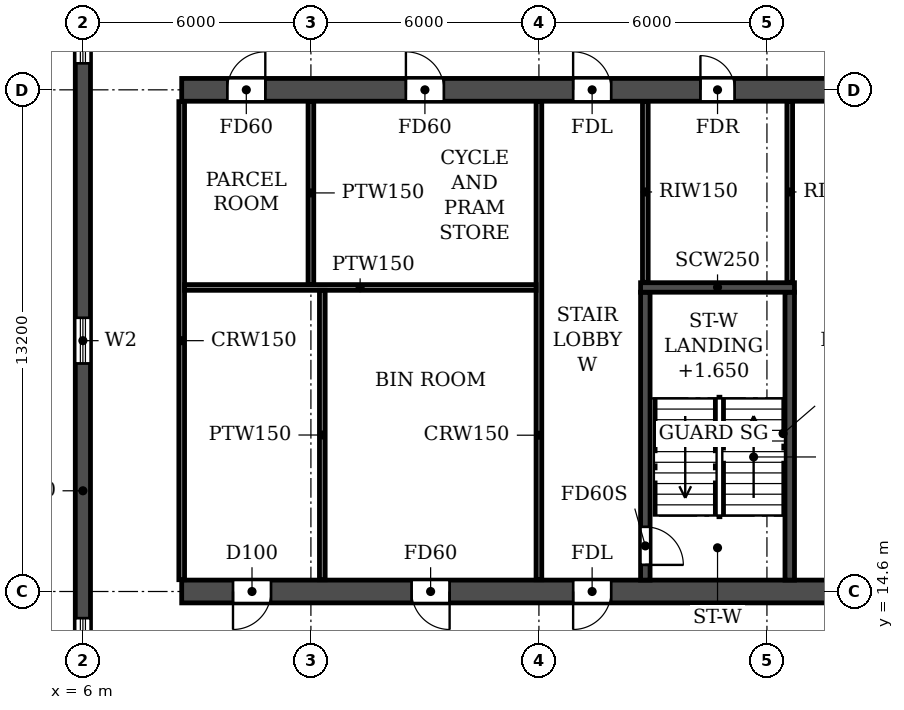
"""IFC4 building model, lengths in metres.
Left out: names, types, materials, properties, quantities, classifications, styles, units other than length and angle.
Written with IfcOpenShell. Run it as: python <this file> out.ifc"""

import sys

from ifc_helpers import new_model, si_unit, direction, frame, frame_2d, origin, place, context, subcontext, project, spatial, rectangle, extrude, element, fill, save


model = new_model("IFC4")
c1 = context("Model", 3, precision=1e-05, world=origin(), true_north=direction((0.0, 1.0)))
c2 = subcontext(c1, "Body", "Model", "MODEL_VIEW")
j1 = project(units=[si_unit("LENGTHUNIT", "METRE"), si_unit("PLANEANGLEUNIT", "RADIAN")], contexts=[c1])
p1 = place(None, origin())
s1 = spatial("IfcSite", under=j1, at=p1, CompositionType="ELEMENT")
p2 = place(p1, origin())
s2 = spatial("IfcBuilding", under=s1, at=p2, CompositionType="ELEMENT")
p3 = place(p2, frame((0.0, 0.0, 56.4)))
s3 = spatial("IfcBuildingStorey", under=s2, at=p3, CompositionType="ELEMENT", Elevation=56.4)
p4 = place(p3, frame((6.0, 4.683, 0.0), z_axis=(0.0, 0.0, 1.0), x_axis=(0.0, 1.0, 0.0)))
e1 = element("IfcWall", 1, at=p4, inside=s3, PredefinedType="SHEAR", context=c2, shape_type="SweptSolid", body=[
    extrude(rectangle(XDim=35.434, YDim=0.4, at=frame_2d((17.717, 0.0))), origin(), (0.0, 0.0, 1.0), 3.05),
])
p5 = place(p4, frame((23.817, 0.0, 0.9)))
e2 = element("IfcOpeningElement", 2, at=p5, cuts=e1, PredefinedType="OPENING", context=c2, shape_type="SweptSolid", body=[
    extrude(rectangle(XDim=1.2, YDim=1.5, at=frame_2d((0.6, 0.75))), frame((0.0, 0.21, 0.0), z_axis=(0.0, -1.0, 0.0), x_axis=(1.0, 0.0, 0.0)), (0.0, 0.0, 1.0), 0.42),
])
p6 = place(p4, frame((8.017, 0.0, 0.9)))
e3 = element("IfcOpeningElement", 3, at=p6, cuts=e1, PredefinedType="OPENING", context=c2, shape_type="SweptSolid", body=[
    extrude(rectangle(XDim=1.2, YDim=1.5, at=frame_2d((0.6, 0.75))), frame((0.0, 0.21, 0.0), z_axis=(0.0, -1.0, 0.0), x_axis=(1.0, 0.0, 0.0)), (0.0, 0.0, 1.0), 0.42),
])
p7 = place(p4, frame((15.917, 0.0, 0.9)))
e4 = element("IfcOpeningElement", 4, at=p7, cuts=e1, PredefinedType="OPENING", context=c2, shape_type="SweptSolid", body=[
    extrude(rectangle(XDim=1.2, YDim=1.5, at=frame_2d((0.6, 0.75))), frame((0.0, 0.21, 0.0), z_axis=(0.0, -1.0, 0.0), x_axis=(1.0, 0.0, 0.0)), (0.0, 0.0, 1.0), 0.42),
])
p8 = place(p4, frame((29.493, 0.0, 0.6)))
e5 = element("IfcOpeningElement", 5, at=p8, cuts=e1, PredefinedType="OPENING", context=c2, shape_type="SweptSolid", body=[
    extrude(rectangle(XDim=2.2, YDim=1.8, at=frame_2d((1.1, 0.9))), frame((0.0, 0.21, 0.0), z_axis=(0.0, -1.0, 0.0), x_axis=(1.0, 0.0, 0.0)), (0.0, 0.0, 1.0), 0.42),
])
p9 = place(p4, frame((2.541, 0.0, 0.6)))
e6 = element("IfcOpeningElement", 6, at=p9, cuts=e1, PredefinedType="OPENING", context=c2, shape_type="SweptSolid", body=[
    extrude(rectangle(XDim=2.2, YDim=1.8, at=frame_2d((1.1, 0.9))), frame((0.0, 0.21, 0.0), z_axis=(0.0, -1.0, 0.0), x_axis=(1.0, 0.0, 0.0)), (0.0, 0.0, 1.0), 0.42),
])
p10 = place(p3, frame((8.6, 14.6, 0.0), z_axis=(0.0, 0.0, 1.0), x_axis=(1.0, 0.0, 0.0)))
e7 = element("IfcWall", 7, at=p10, inside=s3, PredefinedType="SOLIDWALL", context=c2, shape_type="SweptSolid", body=[
    extrude(rectangle(XDim=84.8, YDim=0.6, at=frame_2d((42.4, 0.0))), origin(), (0.0, 0.0, 1.0), 3.05),
])
p11 = place(p10, frame((1.35, 0.0, 0.0)))
e8 = element("IfcOpeningElement", 8, at=p11, cuts=e7, PredefinedType="OPENING", context=c2, shape_type="SweptSolid", body=[
    extrude(rectangle(XDim=1.0, YDim=2.1, at=frame_2d((0.5, 1.05))), frame((0.0, 0.31, 0.0), z_axis=(0.0, -1.0, 0.0), x_axis=(1.0, 0.0, 0.0)), (0.0, 0.0, 1.0), 0.62),
])
p12 = place(p10, frame((6.05, 0.0, 0.0)))
e9 = element("IfcOpeningElement", 9, at=p12, cuts=e7, PredefinedType="OPENING", context=c2, shape_type="SweptSolid", body=[
    extrude(rectangle(XDim=1.0, YDim=2.1, at=frame_2d((0.5, 1.05))), frame((0.0, 0.31, 0.0), z_axis=(0.0, -1.0, 0.0), x_axis=(1.0, 0.0, 0.0)), (0.0, 0.0, 1.0), 0.62),
])
p13 = place(p10, frame((10.3, 0.0, 0.0)))
e10 = element("IfcOpeningElement", 10, at=p13, cuts=e7, PredefinedType="OPENING", context=c2, shape_type="SweptSolid", body=[
    extrude(rectangle(XDim=1.0, YDim=2.1, at=frame_2d((0.5, 1.05))), frame((0.0, 0.31, 0.0), z_axis=(0.0, -1.0, 0.0), x_axis=(1.0, 0.0, 0.0)), (0.0, 0.0, 1.0), 0.62),
])
p14 = place(p10, frame((18.2, 0.0, 0.0)))
e11 = element("IfcOpeningElement", 11, at=p14, cuts=e7, PredefinedType="OPENING", context=c2, shape_type="SweptSolid", body=[
    extrude(rectangle(XDim=1.0, YDim=2.1, at=frame_2d((0.5, 1.05))), frame((0.0, 0.31, 0.0), z_axis=(0.0, -1.0, 0.0), x_axis=(1.0, 0.0, 0.0)), (0.0, 0.0, 1.0), 0.62),
])
p15 = place(p10, frame((22.8, 0.0, 0.0)))
e12 = element("IfcOpeningElement", 12, at=p15, cuts=e7, PredefinedType="OPENING", context=c2, shape_type="SweptSolid", body=[
    extrude(rectangle(XDim=1.0, YDim=2.1, at=frame_2d((0.5, 1.05))), frame((0.0, 0.31, 0.0), z_axis=(0.0, -1.0, 0.0), x_axis=(1.0, 0.0, 0.0)), (0.0, 0.0, 1.0), 0.62),
])
p16 = place(p10, frame((35.4, 0.0, 0.0)))
e13 = element("IfcOpeningElement", 13, at=p16, cuts=e7, PredefinedType="OPENING", context=c2, shape_type="SweptSolid", body=[
    extrude(rectangle(XDim=1.0, YDim=2.1, at=frame_2d((0.5, 1.05))), frame((0.0, 0.31, 0.0), z_axis=(0.0, -1.0, 0.0), x_axis=(1.0, 0.0, 0.0)), (0.0, 0.0, 1.0), 0.62),
])
p17 = place(p10, frame((39.3, 0.0, 0.0)))
e14 = element("IfcOpeningElement", 14, at=p17, cuts=e7, PredefinedType="OPENING", context=c2, shape_type="SweptSolid", body=[
    extrude(rectangle(XDim=1.0, YDim=2.1, at=frame_2d((0.5, 1.05))), frame((0.0, 0.31, 0.0), z_axis=(0.0, -1.0, 0.0), x_axis=(1.0, 0.0, 0.0)), (0.0, 0.0, 1.0), 0.62),
])
p18 = place(p10, frame((41.9, 0.0, 0.0)))
e15 = element("IfcOpeningElement", 15, at=p18, cuts=e7, PredefinedType="OPENING", context=c2, shape_type="SweptSolid", body=[
    extrude(rectangle(XDim=1.0, YDim=2.1, at=frame_2d((0.5, 1.05))), frame((0.0, 0.31, 0.0), z_axis=(0.0, -1.0, 0.0), x_axis=(1.0, 0.0, 0.0)), (0.0, 0.0, 1.0), 0.62),
])
p19 = place(p10, frame((47.1, 0.0, 0.0)))
e16 = element("IfcOpeningElement", 16, at=p19, cuts=e7, PredefinedType="OPENING", context=c2, shape_type="SweptSolid", body=[
    extrude(rectangle(XDim=1.0, YDim=2.1, at=frame_2d((0.5, 1.05))), frame((0.0, 0.31, 0.0), z_axis=(0.0, -1.0, 0.0), x_axis=(1.0, 0.0, 0.0)), (0.0, 0.0, 1.0), 0.62),
])
p20 = place(p10, frame((61.0, 0.0, 0.0)))
e17 = element("IfcOpeningElement", 17, at=p20, cuts=e7, PredefinedType="OPENING", context=c2, shape_type="SweptSolid", body=[
    extrude(rectangle(XDim=1.0, YDim=2.1, at=frame_2d((0.5, 1.05))), frame((0.0, 0.31, 0.0), z_axis=(0.0, -1.0, 0.0), x_axis=(1.0, 0.0, 0.0)), (0.0, 0.0, 1.0), 0.62),
])
p21 = place(p10, frame((65.6, 0.0, 0.0)))
e18 = element("IfcOpeningElement", 18, at=p21, cuts=e7, PredefinedType="OPENING", context=c2, shape_type="SweptSolid", body=[
    extrude(rectangle(XDim=1.0, YDim=2.1, at=frame_2d((0.5, 1.05))), frame((0.0, 0.31, 0.0), z_axis=(0.0, -1.0, 0.0), x_axis=(1.0, 0.0, 0.0)), (0.0, 0.0, 1.0), 0.62),
])
p22 = place(p10, frame((73.5, 0.0, 0.0)))
e19 = element("IfcOpeningElement", 19, at=p22, cuts=e7, PredefinedType="OPENING", context=c2, shape_type="SweptSolid", body=[
    extrude(rectangle(XDim=1.0, YDim=2.1, at=frame_2d((0.5, 1.05))), frame((0.0, 0.31, 0.0), z_axis=(0.0, -1.0, 0.0), x_axis=(1.0, 0.0, 0.0)), (0.0, 0.0, 1.0), 0.62),
])
p23 = place(p10, frame((77.9, 0.0, 0.0)))
e20 = element("IfcOpeningElement", 20, at=p23, cuts=e7, PredefinedType="OPENING", context=c2, shape_type="SweptSolid", body=[
    extrude(rectangle(XDim=1.0, YDim=2.1, at=frame_2d((0.5, 1.05))), frame((0.0, 0.31, 0.0), z_axis=(0.0, -1.0, 0.0), x_axis=(1.0, 0.0, 0.0)), (0.0, 0.0, 1.0), 0.62),
])
p24 = place(p10, frame((82.6, 0.0, 0.0)))
e21 = element("IfcOpeningElement", 21, at=p24, cuts=e7, PredefinedType="OPENING", context=c2, shape_type="SweptSolid", body=[
    extrude(rectangle(XDim=1.0, YDim=2.1, at=frame_2d((0.5, 1.05))), frame((0.0, 0.31, 0.0), z_axis=(0.0, -1.0, 0.0), x_axis=(1.0, 0.0, 0.0)), (0.0, 0.0, 1.0), 0.62),
])
p25 = place(p3, frame((8.6, 27.8, 0.0), z_axis=(0.0, 0.0, 1.0), x_axis=(1.0, 0.0, 0.0)))
e22 = element("IfcWall", 22, at=p25, inside=s3, PredefinedType="SOLIDWALL", context=c2, shape_type="SweptSolid", body=[
    extrude(rectangle(XDim=84.8, YDim=0.6, at=frame_2d((42.4, 0.0))), origin(), (0.0, 0.0, 1.0), 3.05),
])
p26 = place(p25, frame((1.2, 0.0, 0.0)))
e23 = element("IfcOpeningElement", 23, at=p26, cuts=e22, PredefinedType="OPENING", context=c2, shape_type="SweptSolid", body=[
    extrude(rectangle(XDim=1.0, YDim=2.1, at=frame_2d((0.5, 1.05))), frame((0.0, 0.31, 0.0), z_axis=(0.0, -1.0, 0.0), x_axis=(1.0, 0.0, 0.0)), (0.0, 0.0, 1.0), 0.62),
])
p27 = place(p25, frame((5.9, 0.0, 0.0)))
e24 = element("IfcOpeningElement", 24, at=p27, cuts=e22, PredefinedType="OPENING", context=c2, shape_type="SweptSolid", body=[
    extrude(rectangle(XDim=1.0, YDim=2.1, at=frame_2d((0.5, 1.05))), frame((0.0, 0.31, 0.0), z_axis=(0.0, -1.0, 0.0), x_axis=(1.0, 0.0, 0.0)), (0.0, 0.0, 1.0), 0.62),
])
p28 = place(p25, frame((10.3, 0.0, 0.0)))
e25 = element("IfcOpeningElement", 25, at=p28, cuts=e22, PredefinedType="OPENING", context=c2, shape_type="SweptSolid", body=[
    extrude(rectangle(XDim=1.0, YDim=2.1, at=frame_2d((0.5, 1.05))), frame((0.0, 0.31, 0.0), z_axis=(0.0, -1.0, 0.0), x_axis=(1.0, 0.0, 0.0)), (0.0, 0.0, 1.0), 0.62),
])
p29 = place(p25, frame((13.65, 0.0, 0.0)))
e26 = element("IfcOpeningElement", 26, at=p29, cuts=e22, PredefinedType="OPENING", context=c2, shape_type="SweptSolid", body=[
    extrude(rectangle(XDim=0.9, YDim=2.1, at=frame_2d((0.45, 1.05))), frame((0.0, 0.31, 0.0), z_axis=(0.0, -1.0, 0.0), x_axis=(1.0, 0.0, 0.0)), (0.0, 0.0, 1.0), 0.62),
])
p30 = place(p25, frame((22.85, 0.0, 0.0)))
e27 = element("IfcOpeningElement", 27, at=p30, cuts=e22, PredefinedType="OPENING", context=c2, shape_type="SweptSolid", body=[
    extrude(rectangle(XDim=0.9, YDim=2.1, at=frame_2d((0.45, 1.05))), frame((0.0, 0.31, 0.0), z_axis=(0.0, -1.0, 0.0), x_axis=(1.0, 0.0, 0.0)), (0.0, 0.0, 1.0), 0.62),
])
p31 = place(p25, frame((27.3, 0.0, 0.0)))
e28 = element("IfcOpeningElement", 28, at=p31, cuts=e22, PredefinedType="OPENING", context=c2, shape_type="SweptSolid", body=[
    extrude(rectangle(XDim=1.0, YDim=2.1, at=frame_2d((0.5, 1.05))), frame((0.0, 0.31, 0.0), z_axis=(0.0, -1.0, 0.0), x_axis=(1.0, 0.0, 0.0)), (0.0, 0.0, 1.0), 0.62),
])
p32 = place(p25, frame((32.5, 0.0, 0.0)))
e29 = element("IfcOpeningElement", 29, at=p32, cuts=e22, PredefinedType="OPENING", context=c2, shape_type="SweptSolid", body=[
    extrude(rectangle(XDim=1.0, YDim=2.1, at=frame_2d((0.5, 1.05))), frame((0.0, 0.31, 0.0), z_axis=(0.0, -1.0, 0.0), x_axis=(1.0, 0.0, 0.0)), (0.0, 0.0, 1.0), 0.62),
])
p33 = place(p25, frame((39.0, 0.0, 0.0)))
e30 = element("IfcOpeningElement", 30, at=p33, cuts=e22, PredefinedType="OPENING", context=c2, shape_type="SweptSolid", body=[
    extrude(rectangle(XDim=1.0, YDim=2.1, at=frame_2d((0.5, 1.05))), frame((0.0, 0.31, 0.0), z_axis=(0.0, -1.0, 0.0), x_axis=(1.0, 0.0, 0.0)), (0.0, 0.0, 1.0), 0.62),
])
p34 = place(p25, frame((41.9, 0.0, 0.0)))
e31 = element("IfcOpeningElement", 31, at=p34, cuts=e22, PredefinedType="OPENING", context=c2, shape_type="SweptSolid", body=[
    extrude(rectangle(XDim=1.0, YDim=2.1, at=frame_2d((0.5, 1.05))), frame((0.0, 0.31, 0.0), z_axis=(0.0, -1.0, 0.0), x_axis=(1.0, 0.0, 0.0)), (0.0, 0.0, 1.0), 0.62),
])
p35 = place(p25, frame((47.4, 0.0, 0.0)))
e32 = element("IfcOpeningElement", 32, at=p35, cuts=e22, PredefinedType="OPENING", context=c2, shape_type="SweptSolid", body=[
    extrude(rectangle(XDim=1.0, YDim=2.1, at=frame_2d((0.5, 1.05))), frame((0.0, 0.31, 0.0), z_axis=(0.0, -1.0, 0.0), x_axis=(1.0, 0.0, 0.0)), (0.0, 0.0, 1.0), 0.62),
])
p36 = place(p25, frame((53.9, 0.0, 0.0)))
e33 = element("IfcOpeningElement", 33, at=p36, cuts=e22, PredefinedType="OPENING", context=c2, shape_type="SweptSolid", body=[
    extrude(rectangle(XDim=1.0, YDim=2.1, at=frame_2d((0.5, 1.05))), frame((0.0, 0.31, 0.0), z_axis=(0.0, -1.0, 0.0), x_axis=(1.0, 0.0, 0.0)), (0.0, 0.0, 1.0), 0.62),
])
p37 = place(p25, frame((57.8, 0.0, 0.0)))
e34 = element("IfcOpeningElement", 34, at=p37, cuts=e22, PredefinedType="OPENING", context=c2, shape_type="SweptSolid", body=[
    extrude(rectangle(XDim=1.0, YDim=2.1, at=frame_2d((0.5, 1.05))), frame((0.0, 0.31, 0.0), z_axis=(0.0, -1.0, 0.0), x_axis=(1.0, 0.0, 0.0)), (0.0, 0.0, 1.0), 0.62),
])
p38 = place(p25, frame((61.05, 0.0, 0.0)))
e35 = element("IfcOpeningElement", 35, at=p38, cuts=e22, PredefinedType="OPENING", context=c2, shape_type="SweptSolid", body=[
    extrude(rectangle(XDim=0.9, YDim=2.1, at=frame_2d((0.45, 1.05))), frame((0.0, 0.31, 0.0), z_axis=(0.0, -1.0, 0.0), x_axis=(1.0, 0.0, 0.0)), (0.0, 0.0, 1.0), 0.62),
])
p39 = place(p25, frame((70.25, 0.0, 0.0)))
e36 = element("IfcOpeningElement", 36, at=p39, cuts=e22, PredefinedType="OPENING", context=c2, shape_type="SweptSolid", body=[
    extrude(rectangle(XDim=0.9, YDim=2.1, at=frame_2d((0.45, 1.05))), frame((0.0, 0.31, 0.0), z_axis=(0.0, -1.0, 0.0), x_axis=(1.0, 0.0, 0.0)), (0.0, 0.0, 1.0), 0.62),
])
p40 = place(p25, frame((73.5, 0.0, 0.0)))
e37 = element("IfcOpeningElement", 37, at=p40, cuts=e22, PredefinedType="OPENING", context=c2, shape_type="SweptSolid", body=[
    extrude(rectangle(XDim=1.0, YDim=2.1, at=frame_2d((0.5, 1.05))), frame((0.0, 0.31, 0.0), z_axis=(0.0, -1.0, 0.0), x_axis=(1.0, 0.0, 0.0)), (0.0, 0.0, 1.0), 0.62),
])
p41 = place(p25, frame((77.75, 0.0, 0.0)))
e38 = element("IfcOpeningElement", 38, at=p41, cuts=e22, PredefinedType="OPENING", context=c2, shape_type="SweptSolid", body=[
    extrude(rectangle(XDim=1.0, YDim=2.1, at=frame_2d((0.5, 1.05))), frame((0.0, 0.31, 0.0), z_axis=(0.0, -1.0, 0.0), x_axis=(1.0, 0.0, 0.0)), (0.0, 0.0, 1.0), 0.62),
])
p42 = place(p25, frame((82.45, 0.0, 0.0)))
e39 = element("IfcOpeningElement", 39, at=p42, cuts=e22, PredefinedType="OPENING", context=c2, shape_type="SweptSolid", body=[
    extrude(rectangle(XDim=1.0, YDim=2.1, at=frame_2d((0.5, 1.05))), frame((0.0, 0.31, 0.0), z_axis=(0.0, -1.0, 0.0), x_axis=(1.0, 0.0, 0.0)), (0.0, 0.0, 1.0), 0.62),
])
p43 = place(p3, frame((20.8, 14.9, 0.0), z_axis=(0.0, 0.0, 1.0), x_axis=(0.0, 1.0, 0.0)))
e40 = element("IfcWall", 40, at=p43, inside=s3, PredefinedType="SOLIDWALL", context=c2, shape_type="SweptSolid", body=[
    extrude(rectangle(XDim=7.575, YDim=0.25, at=frame_2d((3.788, 0.0))), origin(), (0.0, 0.0, 1.0), 3.05),
])
p44 = place(p43, frame((0.4, 0.0, 0.0)))
e41 = element("IfcOpeningElement", 41, at=p44, cuts=e40, PredefinedType="OPENING", context=c2, shape_type="SweptSolid", body=[
    extrude(rectangle(XDim=1.0, YDim=2.1, at=frame_2d((0.5, 1.05))), frame((0.0, 0.135, 0.0), z_axis=(0.0, -1.0, 0.0), x_axis=(1.0, 0.0, 0.0)), (0.0, 0.0, 1.0), 0.27),
])
p45 = place(p3, frame((24.6, 14.9, 0.0), z_axis=(0.0, 0.0, 1.0), x_axis=(0.0, 1.0, 0.0)))
e42 = element("IfcWall", 42, at=p45, inside=s3, PredefinedType="SOLIDWALL", context=c2, shape_type="SweptSolid", body=[
    extrude(rectangle(XDim=7.575, YDim=0.25, at=frame_2d((3.788, 0.0))), origin(), (0.0, 0.0, 1.0), 3.05),
])
p46 = place(p3, frame((20.675, 22.6, 0.0), z_axis=(0.0, 0.0, 1.0), x_axis=(1.0, 0.0, 0.0)))
e43 = element("IfcWall", 43, at=p46, inside=s3, PredefinedType="SOLIDWALL", context=c2, shape_type="SweptSolid", body=[
    extrude(rectangle(XDim=4.05, YDim=0.25, at=frame_2d((2.025, 0.0))), origin(), (0.0, 0.0, 1.0), 3.05),
])
for number, where, z_axis, x_axis in (
    (44, (8.6, 14.91, 0.0), (0.0, 0.0, 1.0), (0.0, 1.0, 0.0)),
    (45, (18.0, 14.91, 0.0), (0.0, 0.0, 1.0), (0.0, 1.0, 0.0)),
):
    element("IfcWall", number, at=place(p3, frame(where, z_axis=z_axis, x_axis=x_axis)), inside=s3, PredefinedType="PARTITIONING", context=c2, shape_type="SweptSolid", body=[
        extrude(rectangle(XDim=12.58, YDim=0.15, at=frame_2d((6.29, 0.0))), origin(), (0.0, 0.0, 1.0), 3.05),
    ])
p47 = place(p3, frame((8.675, 22.6, 0.0), z_axis=(0.0, 0.0, 1.0), x_axis=(1.0, 0.0, 0.0)))
e46 = element("IfcWall", 46, at=p47, inside=s3, PredefinedType="PARTITIONING", context=c2, shape_type="SweptSolid", body=[
    extrude(rectangle(XDim=9.25, YDim=0.15, at=frame_2d((4.625, 0.0))), origin(), (0.0, 0.0, 1.0), 3.05),
])
p48 = place(p3, frame((12.0, 22.675, 0.0), z_axis=(0.0, 0.0, 1.0), x_axis=(0.0, 1.0, 0.0)))
e47 = element("IfcWall", 47, at=p48, inside=s3, PredefinedType="PARTITIONING", context=c2, shape_type="SweptSolid", body=[
    extrude(rectangle(XDim=4.815, YDim=0.15, at=frame_2d((2.407, 0.0))), origin(), (0.0, 0.0, 1.0), 3.05),
])
p49 = place(p3, frame((12.3, 14.91, 0.0), z_axis=(0.0, 0.0, 1.0), x_axis=(0.0, 1.0, 0.0)))
e48 = element("IfcWall", 48, at=p49, inside=s3, PredefinedType="PARTITIONING", context=c2, shape_type="SweptSolid", body=[
    extrude(rectangle(XDim=7.615, YDim=0.15, at=frame_2d((3.808, 0.0))), origin(), (0.0, 0.0, 1.0), 3.05),
])
for number, where, z_axis, x_axis in (
    (49, (20.8, 22.735, 0.0), (0.0, 0.0, 1.0), (0.0, 1.0, 0.0)),
    (50, (24.6, 22.735, 0.0), (0.0, 0.0, 1.0), (0.0, 1.0, 0.0)),
):
    element("IfcWall", number, at=place(p3, frame(where, z_axis=z_axis, x_axis=x_axis)), inside=s3, PredefinedType="PARTITIONING", context=c2, shape_type="SweptSolid", body=[
        extrude(rectangle(XDim=4.755, YDim=0.15, at=frame_2d((2.377, 0.0))), origin(), (0.0, 0.0, 1.0), 3.05),
    ])
p50 = place(p5, origin())
e51 = element("IfcWindow", 51, at=p50, inside=s3, PartitioningType="SINGLE_PANEL", PredefinedType="WINDOW", context=c2, shape_type="SweptSolid", body=[
    extrude(rectangle(XDim=1.2, YDim=1.5, at=frame_2d((0.6, 0.75))), frame((0.0, 0.03, 0.0), z_axis=(0.0, -1.0, 0.0), x_axis=(1.0, 0.0, 0.0)), (0.0, 0.0, 1.0), 0.06),
])
fill(e2, e51)
p51 = place(p6, origin())
e52 = element("IfcWindow", 52, at=p51, inside=s3, PartitioningType="SINGLE_PANEL", PredefinedType="WINDOW", context=c2, shape_type="SweptSolid", body=[
    extrude(rectangle(XDim=1.2, YDim=1.5, at=frame_2d((0.6, 0.75))), frame((0.0, 0.03, 0.0), z_axis=(0.0, -1.0, 0.0), x_axis=(1.0, 0.0, 0.0)), (0.0, 0.0, 1.0), 0.06),
])
fill(e3, e52)
p52 = place(p7, origin())
e53 = element("IfcWindow", 53, at=p52, inside=s3, PartitioningType="SINGLE_PANEL", PredefinedType="WINDOW", context=c2, shape_type="SweptSolid", body=[
    extrude(rectangle(XDim=1.2, YDim=1.5, at=frame_2d((0.6, 0.75))), frame((0.0, 0.03, 0.0), z_axis=(0.0, -1.0, 0.0), x_axis=(1.0, 0.0, 0.0)), (0.0, 0.0, 1.0), 0.06),
])
fill(e4, e53)
p53 = place(p26, origin())
e54 = element("IfcDoor", 54, at=p53, inside=s3, OperationType="SINGLE_SWING_RIGHT", PredefinedType="DOOR", context=c2, shape_type="SweptSolid", body=[
    extrude(rectangle(XDim=1.0, YDim=2.1, at=frame_2d((0.5, 1.05))), frame((0.0, 0.025, 0.0), z_axis=(0.0, -1.0, 0.0), x_axis=(1.0, 0.0, 0.0)), (0.0, 0.0, 1.0), 0.05),
])
fill(e23, e54)
p54 = place(p27, origin())
e55 = element("IfcDoor", 55, at=p54, inside=s3, OperationType="SINGLE_SWING_LEFT", PredefinedType="DOOR", context=c2, shape_type="SweptSolid", body=[
    extrude(rectangle(XDim=1.0, YDim=2.1, at=frame_2d((0.5, 1.05))), frame((0.0, 0.025, 0.0), z_axis=(0.0, -1.0, 0.0), x_axis=(1.0, 0.0, 0.0)), (0.0, 0.0, 1.0), 0.05),
])
fill(e24, e55)
p55 = place(p28, origin())
e56 = element("IfcDoor", 56, at=p55, inside=s3, OperationType="SINGLE_SWING_LEFT", PredefinedType="DOOR", context=c2, shape_type="SweptSolid", body=[
    extrude(rectangle(XDim=1.0, YDim=2.1, at=frame_2d((0.5, 1.05))), frame((0.0, 0.025, 0.0), z_axis=(0.0, -1.0, 0.0), x_axis=(1.0, 0.0, 0.0)), (0.0, 0.0, 1.0), 0.05),
])
fill(e25, e56)
p56 = place(p29, origin())
e57 = element("IfcDoor", 57, at=p56, inside=s3, OperationType="SINGLE_SWING_LEFT", PredefinedType="DOOR", context=c2, shape_type="SweptSolid", body=[
    extrude(rectangle(XDim=0.9, YDim=2.1, at=frame_2d((0.45, 1.05))), frame((0.0, 0.025, 0.0), z_axis=(0.0, -1.0, 0.0), x_axis=(1.0, 0.0, 0.0)), (0.0, 0.0, 1.0), 0.05),
])
fill(e26, e57)
p57 = place(p11, frame((1.0, 0.0, 0.0), z_axis=(0.0, 0.0, 1.0), x_axis=(-1.0, 0.0, 0.0)))
e58 = element("IfcDoor", 58, at=p57, inside=s3, OperationType="SINGLE_SWING_RIGHT", PredefinedType="DOOR", context=c2, shape_type="SweptSolid", body=[
    extrude(rectangle(XDim=1.0, YDim=2.1, at=frame_2d((0.5, 1.05))), frame((0.0, 0.025, 0.0), z_axis=(0.0, -1.0, 0.0), x_axis=(1.0, 0.0, 0.0)), (0.0, 0.0, 1.0), 0.05),
])
fill(e8, e58)
p58 = place(p12, frame((1.0, 0.0, 0.0), z_axis=(0.0, 0.0, 1.0), x_axis=(-1.0, 0.0, 0.0)))
e59 = element("IfcDoor", 59, at=p58, inside=s3, OperationType="SINGLE_SWING_LEFT", PredefinedType="DOOR", context=c2, shape_type="SweptSolid", body=[
    extrude(rectangle(XDim=1.0, YDim=2.1, at=frame_2d((0.5, 1.05))), frame((0.0, 0.025, 0.0), z_axis=(0.0, -1.0, 0.0), x_axis=(1.0, 0.0, 0.0)), (0.0, 0.0, 1.0), 0.05),
])
fill(e9, e59)
p59 = place(p13, frame((1.0, 0.0, 0.0), z_axis=(0.0, 0.0, 1.0), x_axis=(-1.0, 0.0, 0.0)))
e60 = element("IfcDoor", 60, at=p59, inside=s3, OperationType="SINGLE_SWING_RIGHT", PredefinedType="DOOR", context=c2, shape_type="SweptSolid", body=[
    extrude(rectangle(XDim=1.0, YDim=2.1, at=frame_2d((0.5, 1.05))), frame((0.0, 0.025, 0.0), z_axis=(0.0, -1.0, 0.0), x_axis=(1.0, 0.0, 0.0)), (0.0, 0.0, 1.0), 0.05),
])
fill(e10, e60)
p60 = place(p44, frame((1.0, 0.0, 0.0), z_axis=(0.0, 0.0, 1.0), x_axis=(-1.0, 0.0, 0.0)))
e61 = element("IfcDoor", 61, at=p60, inside=s3, OperationType="SINGLE_SWING_RIGHT", PredefinedType="DOOR", context=c2, shape_type="SweptSolid", body=[
    extrude(rectangle(XDim=1.0, YDim=2.1, at=frame_2d((0.5, 1.05))), frame((0.0, 0.025, 0.0), z_axis=(0.0, -1.0, 0.0), x_axis=(1.0, 0.0, 0.0)), (0.0, 0.0, 1.0), 0.05),
])
fill(e41, e61)
save(model, sys.argv[1])
